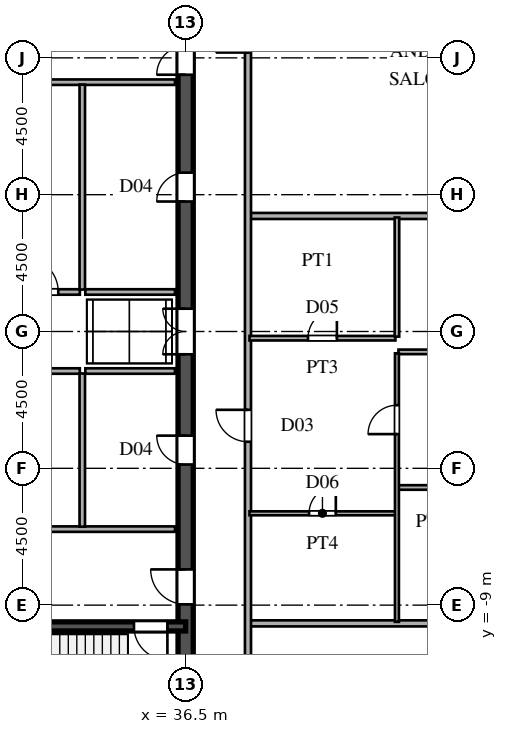
"""IFC4 building model, lengths in metres.
Left out: names, types, materials, properties, quantities, classifications, styles, units other than length and angle.
Written with IfcOpenShell. Run it as: python <this file> out.ifc"""

import sys

from ifc_helpers import new_model, si_unit, direction, frame, frame_2d, origin, place, context, subcontext, project, spatial, rectangle, extrude, source, transform, mapped, element, fill, save


model = new_model("IFC4")
c1 = context("Model", 3, precision=1e-05, world=origin(), true_north=direction((0.0, 1.0)))
c2 = subcontext(c1, "Body", "Model", "MODEL_VIEW")
j1 = project(units=[si_unit("LENGTHUNIT", "METRE"), si_unit("PLANEANGLEUNIT", "RADIAN")], contexts=[c1])
p1 = place(None, origin())
s1 = spatial("IfcSite", under=j1, at=p1, CompositionType="ELEMENT")
p2 = place(p1, origin())
s2 = spatial("IfcBuilding", under=s1, at=p2, CompositionType="ELEMENT")
p3 = place(p2, frame((0.0, 0.0, 261.9)))
s3 = spatial("IfcBuildingStorey", under=s2, at=p3, CompositionType="ELEMENT", Elevation=261.9)
p4 = place(p3, frame((36.5, -13.65, 0.0), z_axis=(0.0, 0.0, 1.0), x_axis=(0.0, 1.0, 0.0)))
e1 = element("IfcWall", 1, at=p4, inside=s3, PredefinedType="SHEAR", context=c2, shape_type="SweptSolid", body=[
    extrude(rectangle(XDim=7.15, YDim=0.5, at=frame_2d((3.575, 0.0))), origin(), (0.0, 0.0, 1.0), 3.53),
])
p5 = place(p4, frame((4.675, 0.0, 0.0)))
e2 = element("IfcOpeningElement", 2, at=p5, cuts=e1, PredefinedType="OPENING", context=c2, shape_type="SweptSolid", body=[
    extrude(rectangle(XDim=1.15, YDim=2.2, at=frame_2d((0.575, 1.1))), frame((0.0, 0.26, 0.0), z_axis=(0.0, -1.0, 0.0), x_axis=(1.0, 0.0, 0.0)), (0.0, 0.0, 1.0), 0.52),
])
p6 = place(p3, frame((36.5, -1.3, 0.0), z_axis=(0.0, 0.0, 1.0), x_axis=(0.0, 1.0, 0.0)))
e3 = element("IfcWall", 3, at=p6, inside=s3, PredefinedType="SHEAR", context=c2, shape_type="SweptSolid", body=[
    extrude(rectangle(XDim=2.6, YDim=0.5, at=frame_2d((1.3, 0.0))), origin(), (0.0, 0.0, 1.0), 3.53),
])
p7 = place(p6, frame((0.55, 0.0, 0.0)))
e4 = element("IfcOpeningElement", 4, at=p7, cuts=e3, PredefinedType="OPENING", context=c2, shape_type="SweptSolid", body=[
    extrude(rectangle(XDim=1.5, YDim=2.3, at=frame_2d((0.75, 1.15))), frame((0.0, 0.26, 0.0), z_axis=(0.0, -1.0, 0.0), x_axis=(1.0, 0.0, 0.0)), (0.0, 0.0, 1.0), 0.52),
])
p8 = place(p3, frame((36.5, 8.2, 0.0), z_axis=(0.0, 0.0, 1.0), x_axis=(0.0, 1.0, 0.0)))
e5 = element("IfcWall", 5, at=p8, inside=s3, PredefinedType="SHEAR", context=c2, shape_type="SweptSolid", body=[
    extrude(rectangle(XDim=5.45, YDim=0.5, at=frame_2d((2.725, 0.0))), origin(), (0.0, 0.0, 1.0), 3.53),
])
p9 = place(p8, frame((0.245, 0.0, 0.0)))
e6 = element("IfcOpeningElement", 6, at=p9, cuts=e5, PredefinedType="OPENING", context=c2, shape_type="SweptSolid", body=[
    extrude(rectangle(XDim=0.95, YDim=2.15, at=frame_2d((0.475, 1.075))), frame((0.0, 0.26, 0.0), z_axis=(0.0, -1.0, 0.0), x_axis=(1.0, 0.0, 0.0)), (0.0, 0.0, 1.0), 0.52),
])
p10 = place(p3, frame((36.5, -6.5, 0.0), z_axis=(0.0, 0.0, 1.0), x_axis=(0.0, 1.0, 0.0)))
e7 = element("IfcWall", 7, at=p10, inside=s3, PredefinedType="SHEAR", context=c2, shape_type="SweptSolid", body=[
    extrude(rectangle(XDim=5.2, YDim=0.5, at=frame_2d((2.6, 0.0))), origin(), (0.0, 0.0, 1.0), 3.53),
])
p11 = place(p10, frame((2.125, 0.0, 0.0)))
e8 = element("IfcOpeningElement", 8, at=p11, cuts=e7, PredefinedType="OPENING", context=c2, shape_type="SweptSolid", body=[
    extrude(rectangle(XDim=0.95, YDim=2.15, at=frame_2d((0.475, 1.075))), frame((0.0, 0.26, 0.0), z_axis=(0.0, -1.0, 0.0), x_axis=(1.0, 0.0, 0.0)), (0.0, 0.0, 1.0), 0.52),
])
p12 = place(p3, frame((36.5, 1.3, 0.0), z_axis=(0.0, 0.0, 1.0), x_axis=(0.0, 1.0, 0.0)))
e9 = element("IfcWall", 9, at=p12, inside=s3, PredefinedType="SHEAR", context=c2, shape_type="SweptSolid", body=[
    extrude(rectangle(XDim=6.9, YDim=0.5, at=frame_2d((3.45, 0.0))), origin(), (0.0, 0.0, 1.0), 3.53),
])
p13 = place(p12, frame((2.975, 0.0, 0.0)))
e10 = element("IfcOpeningElement", 10, at=p13, cuts=e9, PredefinedType="OPENING", context=c2, shape_type="SweptSolid", body=[
    extrude(rectangle(XDim=0.95, YDim=2.15, at=frame_2d((0.475, 1.075))), frame((0.0, 0.26, 0.0), z_axis=(0.0, -1.0, 0.0), x_axis=(1.0, 0.0, 0.0)), (0.0, 0.0, 1.0), 0.52),
])
p14 = place(p3, frame((27.5, -9.7, 0.0), z_axis=(0.0, 0.0, 1.0), x_axis=(1.0, 0.0, 0.0)))
e11 = element("IfcWall", 11, at=p14, inside=s3, PredefinedType="SHEAR", context=c2, shape_type="SweptSolid", body=[
    extrude(rectangle(XDim=9.0, YDim=0.3, at=frame_2d((4.5, 0.0))), origin(), (0.0, 0.0, 1.0), 3.53),
])
p15 = place(p14, frame((7.3, 0.0, 0.0)))
e12 = element("IfcOpeningElement", 12, at=p15, cuts=e11, PredefinedType="OPENING", context=c2, shape_type="SweptSolid", body=[
    extrude(rectangle(XDim=1.1, YDim=2.2, at=frame_2d((0.55, 1.1))), frame((0.0, 0.16, 0.0), z_axis=(0.0, -1.0, 0.0), x_axis=(1.0, 0.0, 0.0)), (0.0, 0.0, 1.0), 0.32),
])
for number, where, z_axis, x_axis in (
    (13, (30.45, -6.5, 0.0), (0.0, 0.0, 1.0), (1.0, 0.0, 0.0)),
    (14, (30.45, 8.2, 0.0), (0.0, 0.0, 1.0), (1.0, 0.0, 0.0)),
):
    element("IfcWall", number, at=place(p3, frame(where, z_axis=z_axis, x_axis=x_axis)), inside=s3, PredefinedType="PARTITIONING", context=c2, shape_type="SweptSolid", body=[
        extrude(rectangle(XDim=5.7, YDim=0.18, at=frame_2d((2.85, 0.0))), origin(), (0.0, 0.0, 1.0), 3.53),
    ])
p16 = place(p3, frame((33.1, -6.42, 0.0), z_axis=(0.0, 0.0, 1.0), x_axis=(0.0, 1.0, 0.0)))
e15 = element("IfcWall", 15, at=p16, inside=s3, PredefinedType="PARTITIONING", context=c2, shape_type="SweptSolid", body=[
    extrude(rectangle(XDim=5.04, YDim=0.18, at=frame_2d((2.52, 0.0))), origin(), (0.0, 0.0, 1.0), 3.53),
])
p17 = place(p3, frame((33.1, 1.38, 0.0), z_axis=(0.0, 0.0, 1.0), x_axis=(0.0, 1.0, 0.0)))
e16 = element("IfcWall", 16, at=p17, inside=s3, PredefinedType="PARTITIONING", context=c2, shape_type="SweptSolid", body=[
    extrude(rectangle(XDim=6.74, YDim=0.18, at=frame_2d((3.37, 0.0))), origin(), (0.0, 0.0, 1.0), 3.53),
])
p18 = place(p3, frame((27.85, -1.3, 0.0), z_axis=(0.0, 0.0, 1.0), x_axis=(1.0, 0.0, 0.0)))
e17 = element("IfcWall", 17, at=p18, inside=s3, PredefinedType="PARTITIONING", context=c2, shape_type="SweptSolid", body=[
    extrude(rectangle(XDim=5.17, YDim=0.18, at=frame_2d((2.585, 0.0))), origin(), (0.0, 0.0, 1.0), 3.53),
])
p19 = place(p18, frame((2.01, 0.0, 0.0)))
e18 = element("IfcOpeningElement", 18, at=p19, cuts=e17, PredefinedType="OPENING", context=c2, shape_type="SweptSolid", body=[
    extrude(rectangle(XDim=1.15, YDim=2.2, at=frame_2d((0.575, 1.1))), frame((0.0, 0.1, 0.0), z_axis=(0.0, -1.0, 0.0), x_axis=(1.0, 0.0, 0.0)), (0.0, 0.0, 1.0), 0.2),
])
p20 = place(p3, frame((30.45, 1.3, 0.0), z_axis=(0.0, 0.0, 1.0), x_axis=(1.0, 0.0, 0.0)))
e19 = element("IfcWall", 19, at=p20, inside=s3, PredefinedType="PARTITIONING", context=c2, shape_type="SweptSolid", body=[
    extrude(rectangle(XDim=2.57, YDim=0.18, at=frame_2d((1.285, 0.0))), origin(), (0.0, 0.0, 1.0), 3.53),
])
p21 = place(p20, frame((0.71, 0.0, 0.0)))
e20 = element("IfcOpeningElement", 20, at=p21, cuts=e19, PredefinedType="OPENING", context=c2, shape_type="SweptSolid", body=[
    extrude(rectangle(XDim=1.15, YDim=2.2, at=frame_2d((0.575, 1.1))), frame((0.0, 0.1, 0.0), z_axis=(0.0, -1.0, 0.0), x_axis=(1.0, 0.0, 0.0)), (0.0, 0.0, 1.0), 0.2),
])
for number, where, z_axis, x_axis in (
    (21, (33.2, -1.3, 0.0), (0.0, 0.0, 1.0), (1.0, 0.0, 0.0)),
    (22, (33.2, 1.3, 0.0), (0.0, 0.0, 1.0), (1.0, 0.0, 0.0)),
):
    element("IfcWall", number, at=place(p3, frame(where, z_axis=z_axis, x_axis=x_axis)), inside=s3, PredefinedType="PARTITIONING", context=c2, shape_type="SweptSolid", body=[
        extrude(rectangle(XDim=2.95, YDim=0.18, at=frame_2d((1.475, 0.0))), origin(), (0.0, 0.0, 1.0), 3.53),
    ])
p22 = place(p3, frame((38.63, -9.6, 0.0), z_axis=(0.0, 0.0, 1.0), x_axis=(1.0, 0.0, 0.0)))
e23 = element("IfcWall", 23, at=p22, inside=s3, PredefinedType="PARTITIONING", context=c2, shape_type="SweptSolid", body=[
    extrude(rectangle(XDim=15.38, YDim=0.2, at=frame_2d((7.69, 0.0))), origin(), (0.0, 0.0, 1.0), 3.53),
])
p23 = place(p3, frame((38.6, -5.98, 0.0), z_axis=(0.0, 0.0, 1.0), x_axis=(1.0, 0.0, 0.0)))
e24 = element("IfcWall", 24, at=p23, inside=s3, PredefinedType="PARTITIONING", context=c2, shape_type="SweptSolid", body=[
    extrude(rectangle(XDim=4.8, YDim=0.13, at=frame_2d((2.4, 0.0))), origin(), (0.0, 0.0, 1.0), 3.53),
])
p24 = place(p23, frame((1.96, 0.0, 0.0)))
e25 = element("IfcOpeningElement", 25, at=p24, cuts=e24, PredefinedType="OPENING", context=c2, shape_type="SweptSolid", body=[
    extrude(rectangle(XDim=0.88, YDim=2.1, at=frame_2d((0.44, 1.05))), frame((0.0, 0.075, 0.0), z_axis=(0.0, -1.0, 0.0), x_axis=(1.0, 0.0, 0.0)), (0.0, 0.0, 1.0), 0.15),
])
p25 = place(p3, frame((43.5, -5.13, 0.0), z_axis=(0.0, 0.0, 1.0), x_axis=(1.0, 0.0, 0.0)))
e26 = element("IfcWall", 26, at=p25, inside=s3, PredefinedType="PARTITIONING", context=c2, shape_type="SweptSolid", body=[
    extrude(rectangle(XDim=17.98, YDim=0.15, at=frame_2d((8.99, 0.0))), origin(), (0.0, 0.0, 1.0), 3.53),
])
p26 = place(p25, frame((5.0, 0.0, 0.0)))
e27 = element("IfcOpeningElement", 27, at=p26, cuts=e26, PredefinedType="OPENING", context=c2, shape_type="SweptSolid", body=[
    extrude(rectangle(XDim=0.95, YDim=2.15, at=frame_2d((0.475, 1.075))), frame((0.0, 0.085, 0.0), z_axis=(0.0, -1.0, 0.0), x_axis=(1.0, 0.0, 0.0)), (0.0, 0.0, 1.0), 0.17),
])
p27 = place(p3, frame((43.5, -0.67, 0.0), z_axis=(0.0, 0.0, 1.0), x_axis=(1.0, 0.0, 0.0)))
e28 = element("IfcWall", 28, at=p27, inside=s3, PredefinedType="PARTITIONING", context=c2, shape_type="SweptSolid", body=[
    extrude(rectangle(XDim=24.035, YDim=0.15, at=frame_2d((12.018, 0.0))), origin(), (0.0, 0.0, 1.0), 3.53),
])
p28 = place(p27, frame((5.0, 0.0, 0.0)))
e29 = element("IfcOpeningElement", 29, at=p28, cuts=e28, PredefinedType="OPENING", context=c2, shape_type="SweptSolid", body=[
    extrude(rectangle(XDim=0.95, YDim=2.15, at=frame_2d((0.475, 1.075))), frame((0.0, 0.085, 0.0), z_axis=(0.0, -1.0, 0.0), x_axis=(1.0, 0.0, 0.0)), (0.0, 0.0, 1.0), 0.17),
])
p29 = place(p3, frame((38.6, -0.22, 0.0), z_axis=(0.0, 0.0, 1.0), x_axis=(1.0, 0.0, 0.0)))
e30 = element("IfcWall", 30, at=p29, inside=s3, PredefinedType="PARTITIONING", context=c2, shape_type="SweptSolid", body=[
    extrude(rectangle(XDim=4.8, YDim=0.15, at=frame_2d((2.4, 0.0))), origin(), (0.0, 0.0, 1.0), 3.53),
])
p30 = place(p29, frame((1.925, 0.0, 0.0)))
e31 = element("IfcOpeningElement", 31, at=p30, cuts=e30, PredefinedType="OPENING", context=c2, shape_type="SweptSolid", body=[
    extrude(rectangle(XDim=0.95, YDim=2.15, at=frame_2d((0.475, 1.075))), frame((0.0, 0.085, 0.0), z_axis=(0.0, -1.0, 0.0), x_axis=(1.0, 0.0, 0.0)), (0.0, 0.0, 1.0), 0.17),
])
p31 = place(p3, frame((38.63, 3.8, 0.0), z_axis=(0.0, 0.0, 1.0), x_axis=(1.0, 0.0, 0.0)))
e32 = element("IfcWall", 32, at=p31, inside=s3, PredefinedType="PARTITIONING", context=c2, shape_type="SweptSolid", body=[
    extrude(rectangle(XDim=25.046, YDim=0.2, at=frame_2d((12.523, 0.0))), origin(), (0.0, 0.0, 1.0), 3.53),
])
p32 = place(p3, frame((38.55, -15.515, 0.0), z_axis=(0.0, 0.0, 1.0), x_axis=(0.0, 1.0, 0.0)))
e33 = element("IfcWall", 33, at=p32, inside=s3, PredefinedType="PARTITIONING", context=c2, shape_type="SweptSolid", body=[
    extrude(rectangle(XDim=31.03, YDim=0.2, at=frame_2d((15.515, 0.0))), origin(), (0.0, 0.0, 1.0), 3.53),
])
p33 = place(p32, frame((2.39, 0.0, 0.0)))
e34 = element("IfcOpeningElement", 34, at=p33, cuts=e33, PredefinedType="OPENING", context=c2, shape_type="SweptSolid", body=[
    extrude(rectangle(XDim=1.05, YDim=2.25, at=frame_2d((0.525, 1.125))), frame((0.0, 0.11, 0.0), z_axis=(0.0, -1.0, 0.0), x_axis=(1.0, 0.0, 0.0)), (0.0, 0.0, 1.0), 0.22),
])
p34 = place(p32, frame((11.889, 0.0, 0.0)))
e35 = element("IfcOpeningElement", 35, at=p34, cuts=e33, PredefinedType="OPENING", context=c2, shape_type="SweptSolid", body=[
    extrude(rectangle(XDim=1.05, YDim=2.25, at=frame_2d((0.525, 1.125))), frame((0.0, 0.11, 0.0), z_axis=(0.0, -1.0, 0.0), x_axis=(1.0, 0.0, 0.0)), (0.0, 0.0, 1.0), 0.22),
])
p35 = place(p32, frame((24.69, 0.0, 0.0)))
e36 = element("IfcOpeningElement", 36, at=p35, cuts=e33, PredefinedType="OPENING", context=c2, shape_type="SweptSolid", body=[
    extrude(rectangle(XDim=1.05, YDim=2.25, at=frame_2d((0.525, 1.125))), frame((0.0, 0.11, 0.0), z_axis=(0.0, -1.0, 0.0), x_axis=(1.0, 0.0, 0.0)), (0.0, 0.0, 1.0), 0.22),
])
p36 = place(p3, frame((43.45, -9.55, 0.0), z_axis=(0.0, 0.0, 1.0), x_axis=(0.0, 1.0, 0.0)))
e37 = element("IfcWall", 37, at=p36, inside=s3, PredefinedType="PARTITIONING", context=c2, shape_type="SweptSolid", body=[
    extrude(rectangle(XDim=8.833, YDim=0.13, at=frame_2d((4.417, 0.0))), origin(), (0.0, 0.0, 1.0), 3.53),
])
p37 = place(p36, frame((6.175, 0.0, 0.0)))
e38 = element("IfcOpeningElement", 38, at=p37, cuts=e37, PredefinedType="OPENING", context=c2, shape_type="SweptSolid", body=[
    extrude(rectangle(XDim=0.95, YDim=2.15, at=frame_2d((0.475, 1.075))), frame((0.0, 0.075, 0.0), z_axis=(0.0, -1.0, 0.0), x_axis=(1.0, 0.0, 0.0)), (0.0, 0.0, 1.0), 0.15),
])
p38 = place(p3, frame((43.45, -0.168, 0.0), z_axis=(0.0, 0.0, 1.0), x_axis=(0.0, 1.0, 0.0)))
e39 = element("IfcWall", 39, at=p38, inside=s3, PredefinedType="PARTITIONING", context=c2, shape_type="SweptSolid", body=[
    extrude(rectangle(XDim=3.918, YDim=0.15, at=frame_2d((1.959, 0.0))), origin(), (0.0, 0.0, 1.0), 3.53),
])
m1 = source(origin(), c2, "Body", "SweptSolid", [
    extrude(rectangle(XDim=1.15, YDim=2.2, at=frame_2d((0.575, 1.1))), frame((0.0, 0.025, 0.0), z_axis=(0.0, -1.0, 0.0), x_axis=(1.0, 0.0, 0.0)), (0.0, 0.0, 1.0), 0.05),
])
p39 = place(p5, origin())
e40 = element("IfcDoor", 40, at=p39, inside=s3, OperationType="SINGLE_SWING_RIGHT", PredefinedType="DOOR", context=c2, shape_type="MappedRepresentation", body=[
    mapped(m1, transform((0.0, 0.0, 0.0), scale=1.0)),
])
fill(e2, e40)
m2 = source(origin(), c2, "Body", "SweptSolid", [
    extrude(rectangle(XDim=1.5, YDim=2.3, at=frame_2d((0.75, 1.15))), frame((0.0, 0.025, 0.0), z_axis=(0.0, -1.0, 0.0), x_axis=(1.0, 0.0, 0.0)), (0.0, 0.0, 1.0), 0.05),
])
p40 = place(p7, origin())
e41 = element("IfcDoor", 41, at=p40, inside=s3, OperationType="DOUBLE_SWING_LEFT", PredefinedType="DOOR", context=c2, shape_type="MappedRepresentation", body=[
    mapped(m2, transform((0.0, 0.0, 0.0), scale=1.0)),
])
fill(e4, e41)
m3 = source(origin(), c2, "Body", "SweptSolid", [
    extrude(rectangle(XDim=0.95, YDim=2.15, at=frame_2d((0.475, 1.075))), frame((0.0, 0.025, 0.0), z_axis=(0.0, -1.0, 0.0), x_axis=(1.0, 0.0, 0.0)), (0.0, 0.0, 1.0), 0.05),
])
p41 = place(p9, origin())
e42 = element("IfcDoor", 42, at=p41, inside=s3, OperationType="SINGLE_SWING_LEFT", PredefinedType="DOOR", context=c2, shape_type="MappedRepresentation", body=[
    mapped(m3, transform((0.0, 0.0, 0.0), scale=1.0)),
])
fill(e6, e42)
p42 = place(p11, origin())
e43 = element("IfcDoor", 43, at=p42, inside=s3, OperationType="SINGLE_SWING_RIGHT", PredefinedType="DOOR", context=c2, shape_type="MappedRepresentation", body=[
    mapped(m3, transform((0.0, 0.0, 0.0), scale=1.0)),
])
fill(e8, e43)
p43 = place(p13, origin())
e44 = element("IfcDoor", 44, at=p43, inside=s3, OperationType="SINGLE_SWING_LEFT", PredefinedType="DOOR", context=c2, shape_type="MappedRepresentation", body=[
    mapped(m3, transform((0.0, 0.0, 0.0), scale=1.0)),
])
fill(e10, e44)
m4 = source(origin(), c2, "Body", "SweptSolid", [
    extrude(rectangle(XDim=1.1, YDim=2.2, at=frame_2d((0.55, 1.1))), frame((0.0, 0.025, 0.0), z_axis=(0.0, -1.0, 0.0), x_axis=(1.0, 0.0, 0.0)), (0.0, 0.0, 1.0), 0.05),
])
p44 = place(p15, frame((1.1, 0.0, 0.0), z_axis=(0.0, 0.0, 1.0), x_axis=(-1.0, 0.0, 0.0)))
e45 = element("IfcDoor", 45, at=p44, inside=s3, OperationType="SINGLE_SWING_RIGHT", PredefinedType="DOOR", context=c2, shape_type="MappedRepresentation", body=[
    mapped(m4, transform((0.0, 0.0, 0.0), scale=1.0)),
])
fill(e12, e45)
p45 = place(p21, origin())
e46 = element("IfcDoor", 46, at=p45, inside=s3, OperationType="SINGLE_SWING_LEFT", PredefinedType="DOOR", context=c2, shape_type="MappedRepresentation", body=[
    mapped(m1, transform((0.0, 0.0, 0.0), scale=1.0)),
])
fill(e20, e46)
m5 = source(origin(), c2, "Body", "SweptSolid", [
    extrude(rectangle(XDim=0.88, YDim=2.1, at=frame_2d((0.44, 1.05))), frame((0.0, 0.025, 0.0), z_axis=(0.0, -1.0, 0.0), x_axis=(1.0, 0.0, 0.0)), (0.0, 0.0, 1.0), 0.05),
])
p46 = place(p24, origin())
e47 = element("IfcDoor", 47, at=p46, inside=s3, OperationType="SINGLE_SWING_RIGHT", PredefinedType="DOOR", context=c2, shape_type="MappedRepresentation", body=[
    mapped(m5, transform((0.0, 0.0, 0.0), scale=1.0)),
])
fill(e25, e47)
m6 = source(origin(), c2, "Body", "SweptSolid", [
    extrude(rectangle(XDim=0.95, YDim=2.15, at=frame_2d((0.475, 1.075))), frame((0.0, 0.025, 0.0), z_axis=(0.0, -1.0, 0.0), x_axis=(1.0, 0.0, 0.0)), (0.0, 0.0, 1.0), 0.05),
])
p47 = place(p30, origin())
e48 = element("IfcDoor", 48, at=p47, inside=s3, OperationType="SINGLE_SWING_RIGHT", PredefinedType="DOOR", context=c2, shape_type="MappedRepresentation", body=[
    mapped(m6, transform((0.0, 0.0, 0.0), scale=1.0)),
])
fill(e31, e48)
m7 = source(origin(), c2, "Body", "SweptSolid", [
    extrude(rectangle(XDim=1.05, YDim=2.25, at=frame_2d((0.525, 1.125))), frame((0.0, 0.025, 0.0), z_axis=(0.0, -1.0, 0.0), x_axis=(1.0, 0.0, 0.0)), (0.0, 0.0, 1.0), 0.05),
])
p48 = place(p34, origin())
e49 = element("IfcDoor", 49, at=p48, inside=s3, OperationType="SINGLE_SWING_RIGHT", PredefinedType="DOOR", context=c2, shape_type="MappedRepresentation", body=[
    mapped(m7, transform((0.0, 0.0, 0.0), scale=1.0)),
])
fill(e35, e49)
p49 = place(p35, origin())
e50 = element("IfcDoor", 50, at=p49, inside=s3, OperationType="SINGLE_SWING_LEFT", PredefinedType="DOOR", context=c2, shape_type="MappedRepresentation", body=[
    mapped(m7, transform((0.0, 0.0, 0.0), scale=1.0)),
])
fill(e36, e50)
p50 = place(p37, origin())
e51 = element("IfcDoor", 51, at=p50, inside=s3, OperationType="SINGLE_SWING_LEFT", PredefinedType="DOOR", context=c2, shape_type="MappedRepresentation", body=[
    mapped(m6, transform((0.0, 0.0, 0.0), scale=1.0)),
])
fill(e38, e51)
save(model, sys.argv[1])
